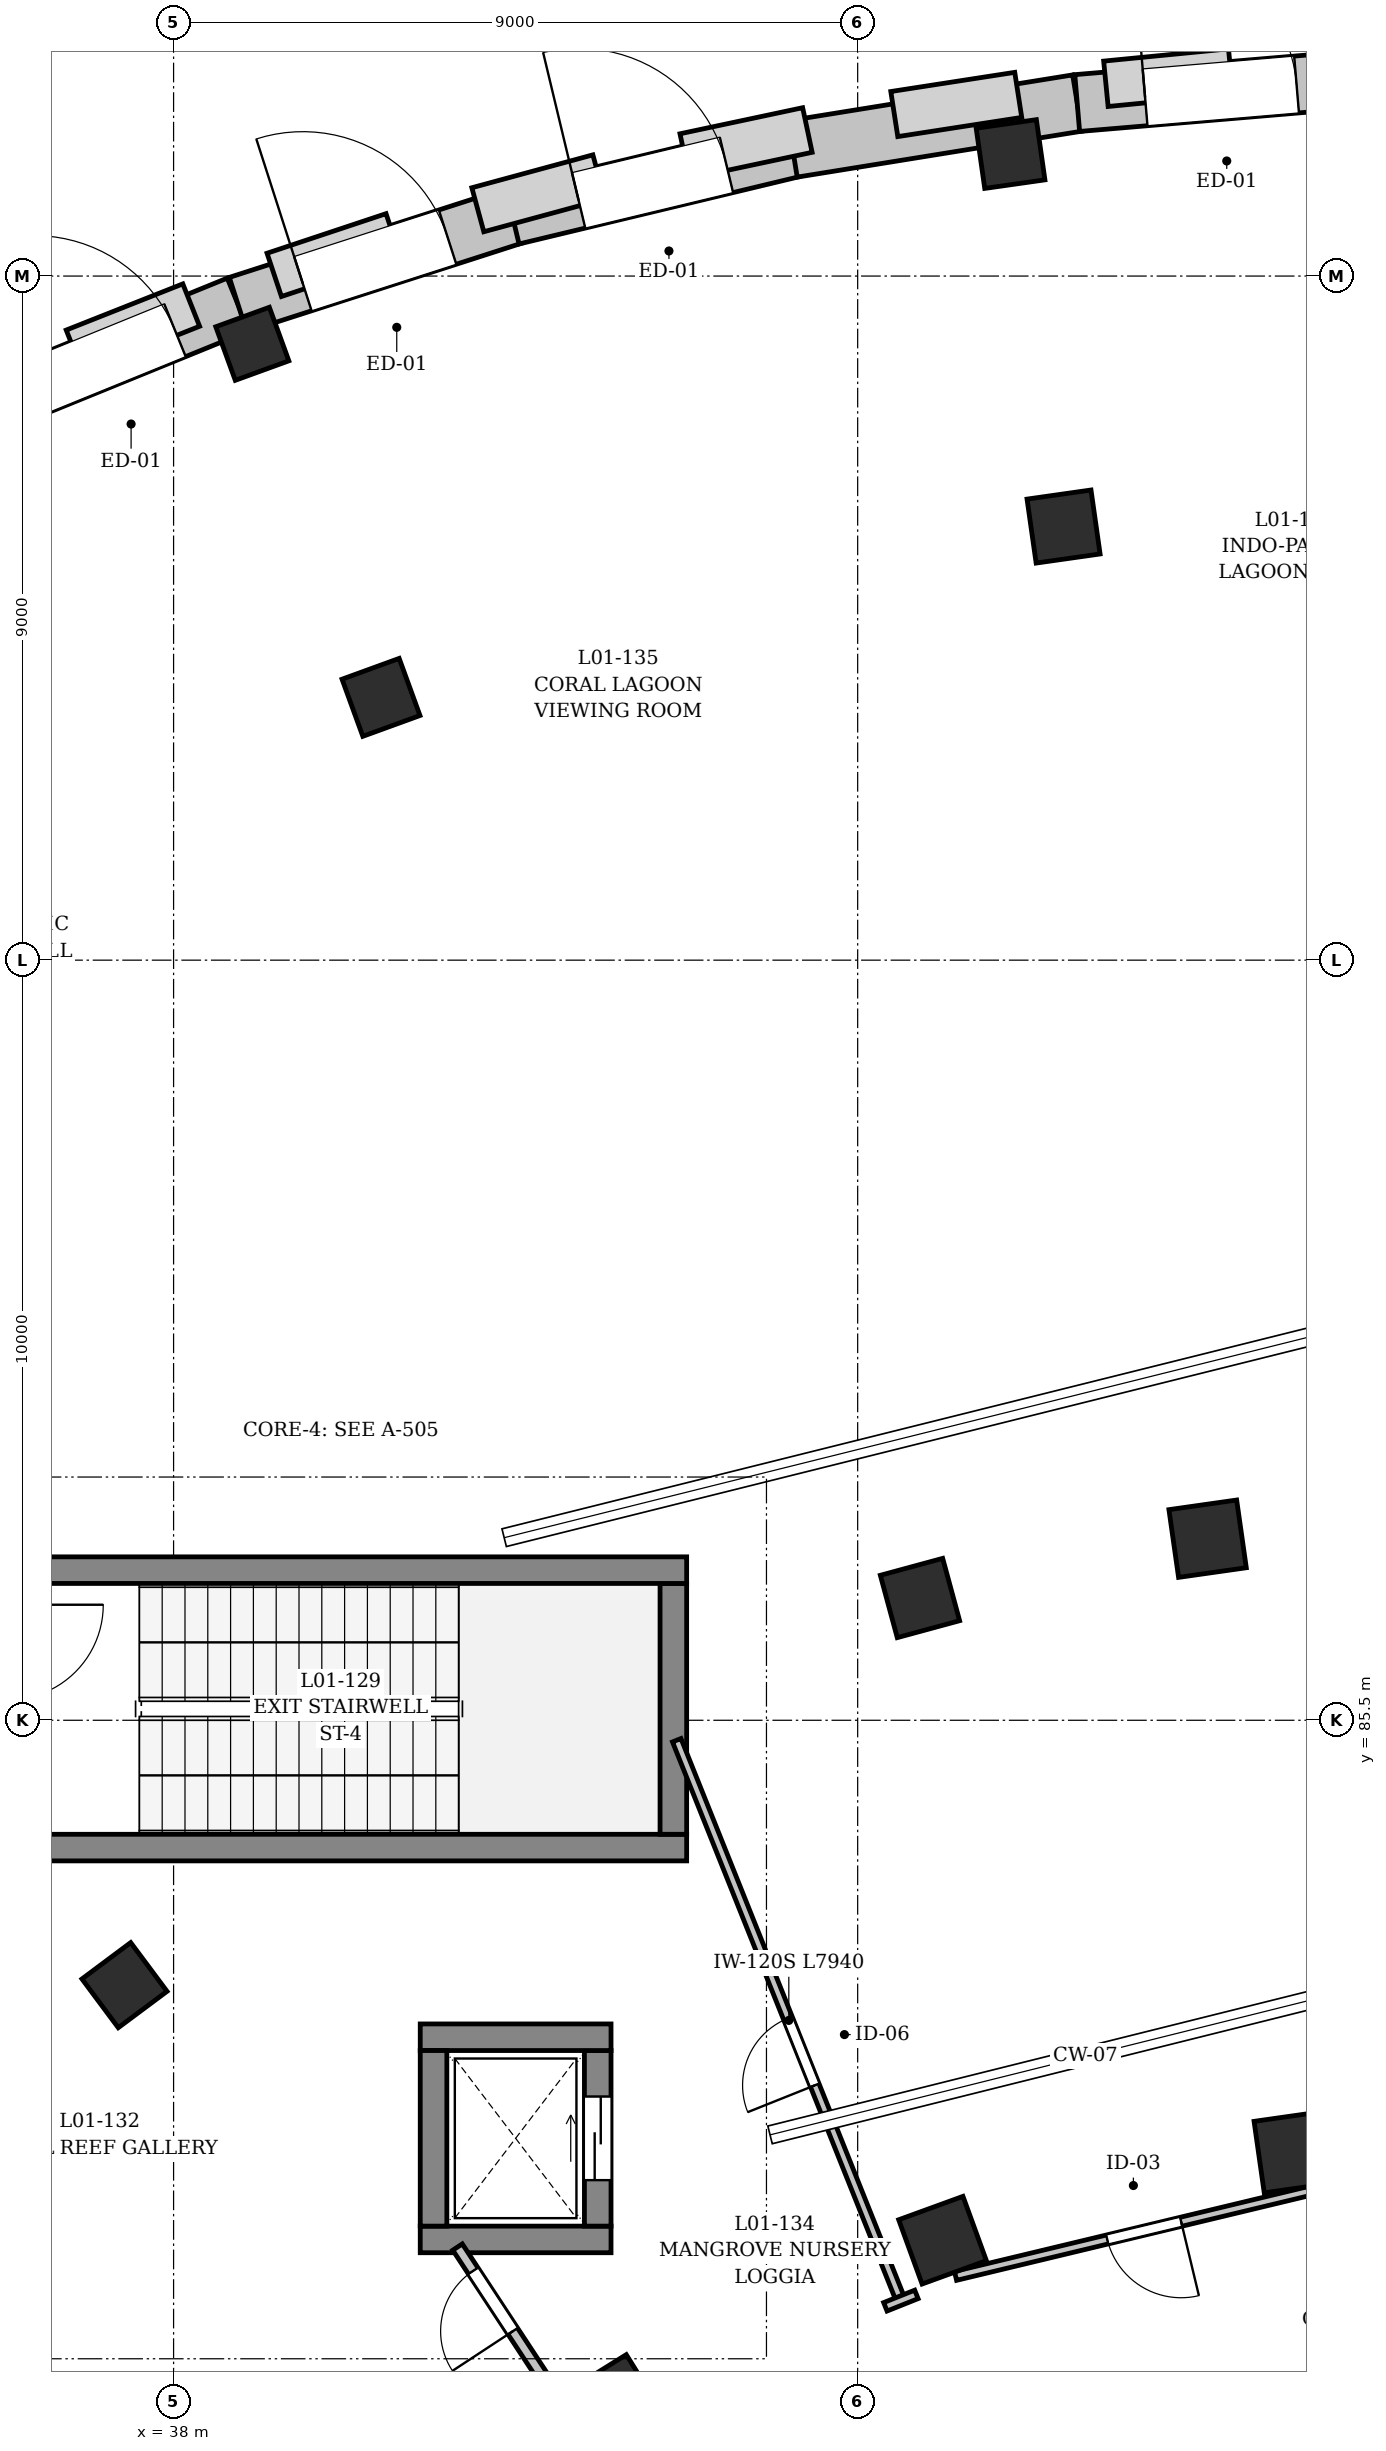
"""IFC4 building model, lengths in metres.
Left out: names, types, materials, properties, quantities, classifications, styles, units other than length and angle.
Written with IfcOpenShell. Run it as: python <this file> out.ifc"""

import sys

from ifc_helpers import new_model, si_unit, direction, frame, frame_2d, origin, origin_2d, place, context, subcontext, project, spatial, rectangle, extrude, element, fill, save


model = new_model("IFC4")
c1 = context("Model", 3, precision=1e-05, world=origin(), true_north=direction((0.0, 1.0)))
c2 = subcontext(c1, "Body", "Model", "MODEL_VIEW")
j1 = project(units=[si_unit("LENGTHUNIT", "METRE"), si_unit("PLANEANGLEUNIT", "RADIAN")], contexts=[c1])
p1 = place(None, origin())
s1 = spatial("IfcSite", under=j1, at=p1, CompositionType="ELEMENT")
p2 = place(p1, origin())
s2 = spatial("IfcBuilding", under=s1, at=p2, CompositionType="ELEMENT")
p3 = place(p2, origin())
s3 = spatial("IfcBuildingStorey", under=s2, at=p3, CompositionType="ELEMENT", Elevation=0.0)
p4 = place(p3, frame((52.752, 79.82, 0.0), z_axis=(0.0, 0.0, 1.0), x_axis=(-0.140901231938, 0.990023657717, 0.0)))
e1 = element("IfcColumn", 1, at=p4, inside=s3, PredefinedType="COLUMN", context=c2, shape_type="SweptSolid", body=[
    extrude(rectangle(XDim=0.95, YDim=0.95, at=origin_2d()), origin(), (0.0, 0.0, 1.0), 5.1),
])
p5 = place(p3, frame((51.604, 87.889, 0.0), z_axis=(0.0, 0.0, 1.0), x_axis=(-0.140901231938, 0.990023657717, 0.0)))
e2 = element("IfcColumn", 2, at=p5, inside=s3, PredefinedType="COLUMN", context=c2, shape_type="SweptSolid", body=[
    extrude(rectangle(XDim=0.9, YDim=0.9, at=origin_2d()), origin(), (0.0, 0.0, 1.0), 5.1),
])
p6 = place(p3, frame((49.709, 101.205, 0.0), z_axis=(0.0, 0.0, 1.0), x_axis=(-0.140901231938, 0.990023657717, 0.0)))
e3 = element("IfcColumn", 3, at=p6, inside=s3, PredefinedType="COLUMN", context=c2, shape_type="SweptSolid", body=[
    extrude(rectangle(XDim=0.85, YDim=0.85, at=origin_2d()), origin(), (0.0, 0.0, 1.0), 5.1),
])
p7 = place(p3, frame((49.011, 106.105, 0.0), z_axis=(0.0, 0.0, 1.0), x_axis=(-0.140901231938, 0.990023657717, 0.0)))
e4 = element("IfcColumn", 4, at=p7, inside=s3, PredefinedType="COLUMN", context=c2, shape_type="SweptSolid", body=[
    extrude(rectangle(XDim=0.8, YDim=0.8, at=origin_2d()), origin(), (0.0, 0.0, 1.0), 5.1),
])
p8 = place(p3, frame((48.116, 78.66, 0.0), z_axis=(0.0, 0.0, 1.0), x_axis=(-0.342020143326, 0.939692620786, 0.0)))
e5 = element("IfcColumn", 5, at=p8, inside=s3, PredefinedType="COLUMN", context=c2, shape_type="SweptSolid", body=[
    extrude(rectangle(XDim=0.9, YDim=0.9, at=origin_2d()), origin(), (0.0, 0.0, 1.0), 5.1),
])
p9 = place(p3, frame((47.82, 87.108, 0.0), z_axis=(0.0, 0.0, 1.0), x_axis=(-0.262189178641, 0.965016494472, 0.0)))
e6 = element("IfcColumn", 6, at=p9, inside=s3, PredefinedType="COLUMN", context=c2, shape_type="SweptSolid", body=[
    extrude(rectangle(XDim=0.85, YDim=0.85, at=origin_2d()), origin(), (0.0, 0.0, 1.0), 5.1),
])
p10 = place(p3, frame((40.729, 98.957, 0.0), z_axis=(0.0, 0.0, 1.0), x_axis=(-0.342020143326, 0.939692620786, 0.0)))
e7 = element("IfcColumn", 7, at=p10, inside=s3, PredefinedType="COLUMN", context=c2, shape_type="SweptSolid", body=[
    extrude(rectangle(XDim=0.8, YDim=0.8, at=origin_2d()), origin(), (0.0, 0.0, 1.0), 5.1),
])
p11 = place(p3, frame((39.036, 103.609, 0.0), z_axis=(0.0, 0.0, 1.0), x_axis=(-0.342020143326, 0.939692620786, 0.0)))
e8 = element("IfcColumn", 8, at=p11, inside=s3, PredefinedType="COLUMN", context=c2, shape_type="SweptSolid", body=[
    extrude(rectangle(XDim=0.75, YDim=0.75, at=origin_2d()), origin(), (0.0, 0.0, 1.0), 5.1),
])
p12 = place(p3, frame((43.82, 76.569, 0.0), z_axis=(0.0, 0.0, 1.0), x_axis=(-0.528438334722, 0.848971687629, 0.0)))
e9 = element("IfcColumn", 9, at=p12, inside=s3, PredefinedType="COLUMN", context=c2, shape_type="SweptSolid", body=[
    extrude(rectangle(XDim=0.85, YDim=0.85, at=origin_2d()), origin(), (0.0, 0.0, 1.0), 5.1),
])
p13 = place(p3, frame((37.354, 82.015, 0.0), z_axis=(0.0, 0.0, 1.0), x_axis=(-0.597625146976, 0.801775644244, 0.0)))
e10 = element("IfcColumn", 10, at=p13, inside=s3, PredefinedType="COLUMN", context=c2, shape_type="SweptSolid", body=[
    extrude(rectangle(XDim=0.8, YDim=0.8, at=origin_2d()), origin(), (0.0, 0.0, 1.0), 5.1),
])
p14 = place(p3, frame((42.226, 70.94, 0.0), z_axis=(0.0, 0.0, 1.0), x_axis=(-0.719340699073, 0.694657439791, 0.0)))
e11 = element("IfcWall", 11, at=p14, inside=s3, PredefinedType="SOLIDWALL", context=c2, shape_type="SweptSolid", body=[
    extrude(rectangle(XDim=11.909, YDim=0.48, at=frame_2d((5.954, 0.0))), origin(), (0.0, 0.0, 1.0), 4.19),
])
p15 = place(p14, frame((4.234, 0.0, 0.9)))
e12 = element("IfcOpeningElement", 12, at=p15, cuts=e11, PredefinedType="OPENING", context=c2, shape_type="SweptSolid", body=[
    extrude(rectangle(XDim=1.4, YDim=2.05, at=frame_2d((0.7, 1.025))), frame((0.0, 0.25, 0.0), z_axis=(0.0, -1.0, 0.0), x_axis=(1.0, 0.0, 0.0)), (0.0, 0.0, 1.0), 0.5),
])
p16 = place(p14, frame((7.054, 0.0, 0.9)))
e13 = element("IfcOpeningElement", 13, at=p16, cuts=e11, PredefinedType="OPENING", context=c2, shape_type="SweptSolid", body=[
    extrude(rectangle(XDim=1.4, YDim=2.05, at=frame_2d((0.7, 1.025))), frame((0.0, 0.25, 0.0), z_axis=(0.0, -1.0, 0.0), x_axis=(1.0, 0.0, 0.0)), (0.0, 0.0, 1.0), 0.5),
])
p17 = place(p3, frame((35.336, 102.695, 0.0), z_axis=(0.0, 0.0, 1.0), x_axis=(0.92607319541, 0.377343923686, 0.0)))
e14 = element("IfcWall", 14, at=p17, inside=s3, PredefinedType="SOLIDWALL", context=c2, shape_type="SweptSolid", body=[
    extrude(rectangle(XDim=3.792, YDim=0.75, at=frame_2d((1.896, 0.0))), origin(), (0.0, 0.0, 1.0), 4.09),
])
p18 = place(p17, frame((0.896, 0.0, 0.0)))
e15 = element("IfcOpeningElement", 15, at=p18, cuts=e14, PredefinedType="OPENING", context=c2, shape_type="SweptSolid", body=[
    extrude(rectangle(XDim=2.0, YDim=2.5, at=frame_2d((1.0, 1.25))), frame((0.0, 0.385, 0.0), z_axis=(0.0, -1.0, 0.0), x_axis=(1.0, 0.0, 0.0)), (0.0, 0.0, 1.0), 0.77),
])
p19 = place(p3, frame((38.848, 104.125, 0.0), z_axis=(0.0, 0.0, 1.0), x_axis=(0.951959535224, 0.306223845081, 0.0)))
e16 = element("IfcWall", 16, at=p19, inside=s3, PredefinedType="SOLIDWALL", context=c2, shape_type="SweptSolid", body=[
    extrude(rectangle(XDim=3.792, YDim=0.75, at=frame_2d((1.896, 0.0))), origin(), (0.0, 0.0, 1.0), 4.09),
])
p20 = place(p19, frame((0.896, 0.0, 0.0)))
e17 = element("IfcOpeningElement", 17, at=p20, cuts=e16, PredefinedType="OPENING", context=c2, shape_type="SweptSolid", body=[
    extrude(rectangle(XDim=2.0, YDim=2.5, at=frame_2d((1.0, 1.25))), frame((0.0, 0.385, 0.0), z_axis=(0.0, -1.0, 0.0), x_axis=(1.0, 0.0, 0.0)), (0.0, 0.0, 1.0), 0.77),
])
p21 = place(p3, frame((42.458, 105.287, 0.0), z_axis=(0.0, 0.0, 1.0), x_axis=(0.972368597745, 0.233450873033, 0.0)))
e18 = element("IfcWall", 18, at=p21, inside=s3, PredefinedType="SOLIDWALL", context=c2, shape_type="SweptSolid", body=[
    extrude(rectangle(XDim=3.792, YDim=0.75, at=frame_2d((1.896, 0.0))), origin(), (0.0, 0.0, 1.0), 5.1),
])
p22 = place(p21, frame((0.896, 0.0, 0.0)))
e19 = element("IfcOpeningElement", 19, at=p22, cuts=e18, PredefinedType="OPENING", context=c2, shape_type="SweptSolid", body=[
    extrude(rectangle(XDim=2.0, YDim=2.5, at=frame_2d((1.0, 1.25))), frame((0.0, 0.385, 0.0), z_axis=(0.0, -1.0, 0.0), x_axis=(1.0, 0.0, 0.0)), (0.0, 0.0, 1.0), 0.77),
])
p23 = place(p3, frame((46.145, 106.172, 0.0), z_axis=(0.0, 0.0, 1.0), x_axis=(0.987231650427, 0.159291143492, 0.0)))
e20 = element("IfcWall", 20, at=p23, inside=s3, PredefinedType="SOLIDWALL", context=c2, shape_type="SweptSolid", body=[
    extrude(rectangle(XDim=3.792, YDim=0.75, at=frame_2d((1.896, 0.0))), origin(), (0.0, 0.0, 1.0), 3.99),
])
p24 = place(p3, frame((49.888, 106.776, 0.0), z_axis=(0.0, 0.0, 1.0), x_axis=(0.996442430759, 0.084276225487, 0.0)))
e21 = element("IfcWall", 21, at=p24, inside=s3, PredefinedType="SOLIDWALL", context=c2, shape_type="SweptSolid", body=[
    extrude(rectangle(XDim=3.792, YDim=0.75, at=frame_2d((1.896, 0.0))), origin(), (0.0, 0.0, 1.0), 5.1),
])
p25 = place(p24, frame((0.896, 0.0, 0.0)))
e22 = element("IfcOpeningElement", 22, at=p25, cuts=e21, PredefinedType="OPENING", context=c2, shape_type="SweptSolid", body=[
    extrude(rectangle(XDim=2.0, YDim=2.5, at=frame_2d((1.0, 1.25))), frame((0.0, 0.385, 0.0), z_axis=(0.0, -1.0, 0.0), x_axis=(1.0, 0.0, 0.0)), (0.0, 0.0, 1.0), 0.77),
])
p26 = place(p3, frame((35.65, 83.825, 0.0), z_axis=(0.0, 0.0, 1.0), x_axis=(1.0, 0.0, 0.0)))
e23 = element("IfcWall", 23, at=p26, inside=s3, PredefinedType="SHEAR", context=c2, shape_type="SweptSolid", body=[
    extrude(rectangle(XDim=9.1, YDim=0.35, at=frame_2d((4.55, 0.0))), origin(), (0.0, 0.0, 1.0), 5.1),
])
p27 = place(p3, frame((44.575, 84.0, 0.0), z_axis=(0.0, 0.0, 1.0), x_axis=(0.0, 1.0, 0.0)))
e24 = element("IfcWall", 24, at=p27, inside=s3, PredefinedType="SHEAR", context=c2, shape_type="SweptSolid", body=[
    extrude(rectangle(XDim=3.3, YDim=0.35, at=frame_2d((1.65, 0.0))), origin(), (0.0, 0.0, 1.0), 5.1),
])
p28 = place(p3, frame((44.75, 87.475, 0.0), z_axis=(0.0, 0.0, 1.0), x_axis=(-1.0, 0.0, 0.0)))
e25 = element("IfcWall", 25, at=p28, inside=s3, PredefinedType="SHEAR", context=c2, shape_type="SweptSolid", body=[
    extrude(rectangle(XDim=9.1, YDim=0.35, at=frame_2d((4.55, 0.0))), origin(), (0.0, 0.0, 1.0), 5.1),
])
p29 = place(p3, frame((41.245, 78.67, 0.0), z_axis=(0.0, 0.0, 1.0), x_axis=(1.0, 0.0, 0.0)))
e26 = element("IfcWall", 26, at=p29, inside=s3, PredefinedType="SHEAR", context=c2, shape_type="SweptSolid", body=[
    extrude(rectangle(XDim=2.51, YDim=0.35, at=frame_2d((1.255, 0.0))), origin(), (0.0, 0.0, 1.0), 5.1),
])
p30 = place(p3, frame((43.58, 78.845, 0.0), z_axis=(0.0, 0.0, 1.0), x_axis=(0.0, 1.0, 0.0)))
e27 = element("IfcWall", 27, at=p30, inside=s3, PredefinedType="SHEAR", context=c2, shape_type="SweptSolid", body=[
    extrude(rectangle(XDim=2.31, YDim=0.35, at=frame_2d((1.155, 0.0))), origin(), (0.0, 0.0, 1.0), 5.1),
])
p31 = place(p30, frame((0.605, 0.0, 0.0)))
e28 = element("IfcOpeningElement", 28, at=p31, cuts=e27, PredefinedType="OPENING", context=c2, shape_type="SweptSolid", body=[
    extrude(rectangle(XDim=1.1, YDim=2.2, at=frame_2d((0.55, 1.1))), frame((0.0, 0.185, 0.0), z_axis=(0.0, -1.0, 0.0), x_axis=(1.0, 0.0, 0.0)), (0.0, 0.0, 1.0), 0.37),
])
p32 = place(p3, frame((43.755, 81.33, 0.0), z_axis=(0.0, 0.0, 1.0), x_axis=(-1.0, 0.0, 0.0)))
e29 = element("IfcWall", 29, at=p32, inside=s3, PredefinedType="SHEAR", context=c2, shape_type="SweptSolid", body=[
    extrude(rectangle(XDim=2.51, YDim=0.35, at=frame_2d((1.255, 0.0))), origin(), (0.0, 0.0, 1.0), 5.1),
])
p33 = place(p3, frame((41.42, 81.155, 0.0), z_axis=(0.0, 0.0, 1.0), x_axis=(0.0, -1.0, 0.0)))
e30 = element("IfcWall", 30, at=p33, inside=s3, PredefinedType="SHEAR", context=c2, shape_type="SweptSolid", body=[
    extrude(rectangle(XDim=2.31, YDim=0.35, at=frame_2d((1.155, 0.0))), origin(), (0.0, 0.0, 1.0), 5.1),
])
p34 = place(p3, frame((53.252, 79.382, 0.0), z_axis=(0.0, 0.0, 1.0), x_axis=(-0.972378185718, -0.233410933633, 0.0)))
e31 = element("IfcWall", 31, at=p34, inside=s3, PredefinedType="PARTITIONING", context=c2, shape_type="SweptSolid", body=[
    extrude(rectangle(XDim=5.105, YDim=0.12, at=frame_2d((2.553, 0.0))), origin(), (0.0, 0.0, 1.0), 3.99),
])
p35 = place(p34, frame((2.053, 0.0, 0.0)))
e32 = element("IfcOpeningElement", 32, at=p35, cuts=e31, PredefinedType="OPENING", context=c2, shape_type="SweptSolid", body=[
    extrude(rectangle(XDim=1.0, YDim=2.2, at=frame_2d((0.5, 1.1))), frame((0.0, 0.07, 0.0), z_axis=(0.0, -1.0, 0.0), x_axis=(1.0, 0.0, 0.0)), (0.0, 0.0, 1.0), 0.14),
])
p36 = place(p3, frame((43.548, 75.811, 0.0), z_axis=(0.0, 0.0, 1.0), x_axis=(-0.549055392423, 0.835785963062, 0.0)))
e33 = element("IfcWall", 33, at=p36, inside=s3, PredefinedType="PARTITIONING", context=c2, shape_type="SweptSolid", body=[
    extrude(rectangle(XDim=3.301, YDim=0.15, at=frame_2d((1.65, 0.0))), origin(), (0.0, 0.0, 1.0), 4.09),
])
p37 = place(p36, frame((1.976, 0.0, 0.0)))
e34 = element("IfcOpeningElement", 34, at=p37, cuts=e33, PredefinedType="OPENING", context=c2, shape_type="SweptSolid", body=[
    extrude(rectangle(XDim=0.95, YDim=2.2, at=frame_2d((0.475, 1.1))), frame((0.0, 0.085, 0.0), z_axis=(0.0, -1.0, 0.0), x_axis=(1.0, 0.0, 0.0)), (0.0, 0.0, 1.0), 0.17),
])
p38 = place(p3, frame((47.568, 77.865, 0.0), z_axis=(0.0, 0.0, 1.0), x_axis=(-0.371358869186, 0.928489413121, 0.0)))
e35 = element("IfcWall", 35, at=p38, inside=s3, PredefinedType="PARTITIONING", context=c2, shape_type="SweptSolid", body=[
    extrude(rectangle(XDim=7.94, YDim=0.12, at=frame_2d((3.97, 0.0))), origin(), (0.0, 0.0, 1.0), 4.39),
])
p39 = place(p38, frame((3.05, 0.0, 0.0)))
e36 = element("IfcOpeningElement", 36, at=p39, cuts=e35, PredefinedType="OPENING", context=c2, shape_type="SweptSolid", body=[
    extrude(rectangle(XDim=0.95, YDim=2.2, at=frame_2d((0.475, 1.1))), frame((0.0, 0.07, 0.0), z_axis=(0.0, -1.0, 0.0), x_axis=(1.0, 0.0, 0.0)), (0.0, 0.0, 1.0), 0.14),
])
p40 = place(p3, frame((47.773, 77.947, 0.0), z_axis=(0.0, 0.0, 1.0), x_axis=(-0.928591414988, -0.371103737531, 0.0)))
e37 = element("IfcWall", 37, at=p40, inside=s3, PredefinedType="PARTITIONING", context=c2, shape_type="SweptSolid", body=[
    extrude(rectangle(XDim=0.44, YDim=0.12, at=frame_2d((0.22, 0.0))), origin(), (0.0, 0.0, 1.0), 5.1),
])
p41 = place(p18, origin())
e38 = element("IfcDoor", 38, at=p41, inside=s3, OperationType="DOUBLE_DOOR_SINGLE_SWING", PredefinedType="DOOR", context=c2, shape_type="SweptSolid", body=[
    extrude(rectangle(XDim=2.0, YDim=2.5, at=frame_2d((1.0, 1.25))), frame((0.0, 0.025, 0.0), z_axis=(0.0, -1.0, 0.0), x_axis=(1.0, 0.0, 0.0)), (0.0, 0.0, 1.0), 0.05),
])
fill(e15, e38)
p42 = place(p20, origin())
e39 = element("IfcDoor", 39, at=p42, inside=s3, OperationType="DOUBLE_DOOR_SINGLE_SWING", PredefinedType="DOOR", context=c2, shape_type="SweptSolid", body=[
    extrude(rectangle(XDim=2.0, YDim=2.5, at=frame_2d((1.0, 1.25))), frame((0.0, 0.025, 0.0), z_axis=(0.0, -1.0, 0.0), x_axis=(1.0, 0.0, 0.0)), (0.0, 0.0, 1.0), 0.05),
])
fill(e17, e39)
p43 = place(p22, origin())
e40 = element("IfcDoor", 40, at=p43, inside=s3, OperationType="DOUBLE_DOOR_SINGLE_SWING", PredefinedType="DOOR", context=c2, shape_type="SweptSolid", body=[
    extrude(rectangle(XDim=2.0, YDim=2.5, at=frame_2d((1.0, 1.25))), frame((0.0, 0.025, 0.0), z_axis=(0.0, -1.0, 0.0), x_axis=(1.0, 0.0, 0.0)), (0.0, 0.0, 1.0), 0.05),
])
fill(e19, e40)
p44 = place(p25, origin())
e41 = element("IfcDoor", 41, at=p44, inside=s3, OperationType="DOUBLE_DOOR_SINGLE_SWING", PredefinedType="DOOR", context=c2, shape_type="SweptSolid", body=[
    extrude(rectangle(XDim=2.0, YDim=2.5, at=frame_2d((1.0, 1.25))), frame((0.0, 0.025, 0.0), z_axis=(0.0, -1.0, 0.0), x_axis=(1.0, 0.0, 0.0)), (0.0, 0.0, 1.0), 0.05),
])
fill(e22, e41)
p45 = place(p31, origin())
e42 = element("IfcDoor", 42, at=p45, inside=s3, OperationType="SLIDING_TO_LEFT", PredefinedType="DOOR", context=c2, shape_type="SweptSolid", body=[
    extrude(rectangle(XDim=1.1, YDim=2.2, at=frame_2d((0.55, 1.1))), frame((0.0, 0.025, 0.0), z_axis=(0.0, -1.0, 0.0), x_axis=(1.0, 0.0, 0.0)), (0.0, 0.0, 1.0), 0.05),
])
fill(e28, e42)
p46 = place(p35, origin())
e43 = element("IfcDoor", 43, at=p46, inside=s3, OperationType="SINGLE_SWING_LEFT", PredefinedType="DOOR", context=c2, shape_type="SweptSolid", body=[
    extrude(rectangle(XDim=1.0, YDim=2.2, at=frame_2d((0.5, 1.1))), frame((0.0, 0.025, 0.0), z_axis=(0.0, -1.0, 0.0), x_axis=(1.0, 0.0, 0.0)), (0.0, 0.0, 1.0), 0.05),
])
fill(e32, e43)
p47 = place(p37, origin())
e44 = element("IfcDoor", 44, at=p47, inside=s3, OperationType="SINGLE_SWING_LEFT", PredefinedType="DOOR", context=c2, shape_type="SweptSolid", body=[
    extrude(rectangle(XDim=0.95, YDim=2.2, at=frame_2d((0.475, 1.1))), frame((0.0, 0.025, 0.0), z_axis=(0.0, -1.0, 0.0), x_axis=(1.0, 0.0, 0.0)), (0.0, 0.0, 1.0), 0.05),
])
fill(e34, e44)
p48 = place(p39, origin())
e45 = element("IfcDoor", 45, at=p48, inside=s3, OperationType="SINGLE_SWING_RIGHT", PredefinedType="DOOR", context=c2, shape_type="SweptSolid", body=[
    extrude(rectangle(XDim=0.95, YDim=2.2, at=frame_2d((0.475, 1.1))), frame((0.0, 0.025, 0.0), z_axis=(0.0, -1.0, 0.0), x_axis=(1.0, 0.0, 0.0)), (0.0, 0.0, 1.0), 0.05),
])
fill(e36, e45)
save(model, sys.argv[1])
